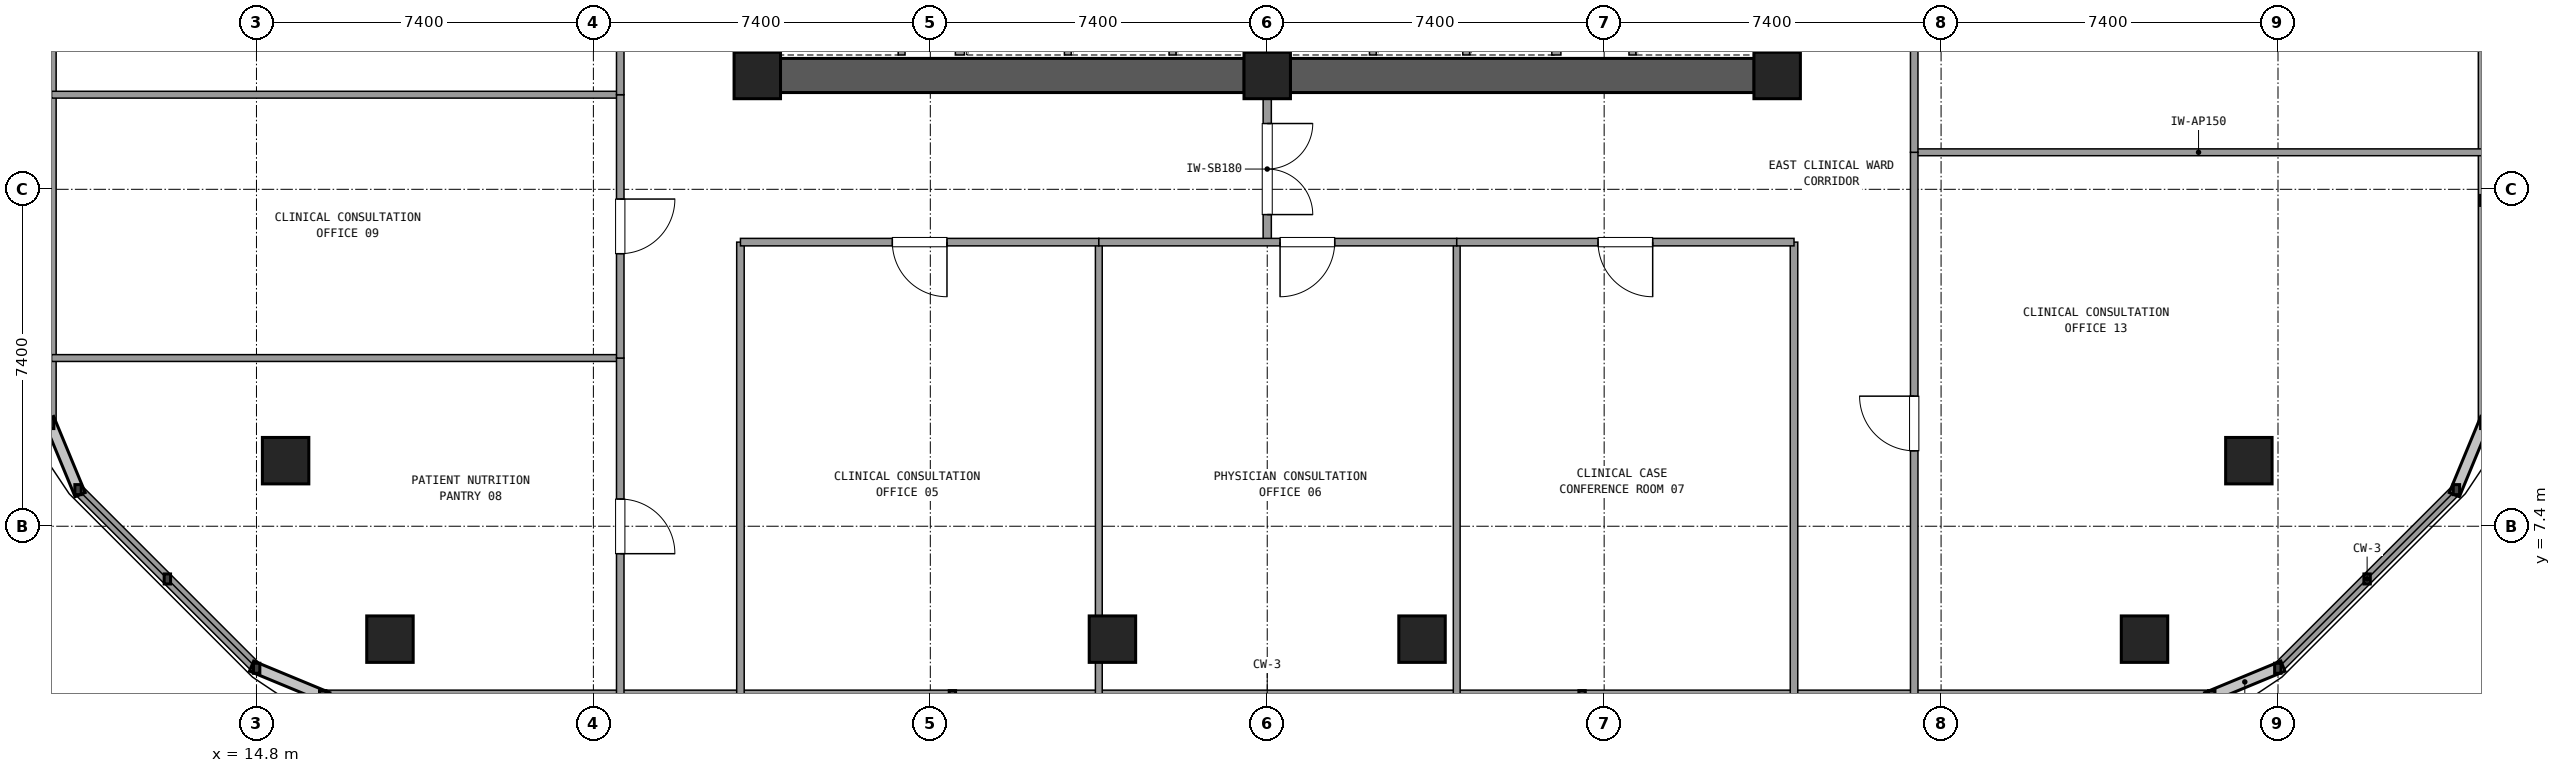
"""IFC4 building model, lengths in metres.
Left out: names, types, materials, properties, quantities, classifications, styles, units other than length and angle.
Written with IfcOpenShell. Run it as: python <this file> out.ifc"""

import sys

from ifc_helpers import new_model, si_unit, direction, frame, frame_2d, origin, origin_2d, place, context, subcontext, project, spatial, rectangle, extrude, element, fill, save


model = new_model("IFC4")
c1 = context("Model", 3, precision=1e-05, world=origin(), true_north=direction((0.0, 1.0)))
c2 = subcontext(c1, "Body", "Model", "MODEL_VIEW")
j1 = project(units=[si_unit("LENGTHUNIT", "METRE"), si_unit("PLANEANGLEUNIT", "RADIAN")], contexts=[c1])
p1 = place(None, origin())
s1 = spatial("IfcSite", under=j1, at=p1, CompositionType="ELEMENT")
p2 = place(p1, origin())
s2 = spatial("IfcBuilding", under=s1, at=p2, CompositionType="ELEMENT")
p3 = place(p2, frame((0.0, 0.0, 81.18)))
s3 = spatial("IfcBuildingStorey", under=s2, at=p3, CompositionType="ELEMENT", Elevation=81.18)
for number, where, z_axis, x_axis in (
    (1, (25.8, 17.3, 0.0), (0.0, 0.0, 1.0), (1.0, 0.0, 0.0)),
    (2, (37.0, 17.3, 0.0), (0.0, 0.0, 1.0), (1.0, 0.0, 0.0)),
    (3, (48.2, 17.3, 0.0), (0.0, 0.0, 1.0), (1.0, 0.0, 0.0)),
):
    element("IfcColumn", number, at=place(p3, frame(where, z_axis=z_axis, x_axis=x_axis)), inside=s3, PredefinedType="COLUMN", context=c2, shape_type="SweptSolid", body=[
        extrude(rectangle(XDim=1.02, YDim=1.02, at=origin_2d()), origin(), (0.0, 0.0, 1.0), 3.6),
    ])
for number, where, z_axis, x_axis in (
    (4, (26.305, 17.3, 0.0), (0.0, 0.0, 1.0), (1.0, 0.0, 0.0)),
    (5, (37.505, 17.3, 0.0), (0.0, 0.0, 1.0), (1.0, 0.0, 0.0)),
):
    element("IfcWall", number, at=place(p3, frame(where, z_axis=z_axis, x_axis=x_axis)), inside=s3, PredefinedType="SHEAR", context=c2, shape_type="SweptSolid", body=[
        extrude(rectangle(XDim=10.19, YDim=0.75, at=frame_2d((5.095, 0.0))), origin(), (0.0, 0.0, 1.0), 3.32),
    ])
for number, where, z_axis, x_axis in (
    (6, (15.44, 8.84, 0.0), (0.0, 0.0, 1.0), (1.0, 0.0, 0.0)),
    (7, (17.732, 4.92, 0.0), (0.0, 0.0, 1.0), (1.0, 0.0, 0.0)),
    (8, (33.6, 4.92, 0.0), (0.0, 0.0, 1.0), (1.0, 0.0, 0.0)),
    (9, (40.4, 4.92, 0.0), (0.0, 0.0, 1.0), (1.0, 0.0, 0.0)),
    (10, (56.268, 4.92, 0.0), (0.0, 0.0, 1.0), (1.0, 0.0, 0.0)),
    (11, (58.56, 8.84, 0.0), (0.0, 0.0, 1.0), (1.0, 0.0, 0.0)),
):
    element("IfcColumn", number, at=place(p3, frame(where, z_axis=z_axis, x_axis=x_axis)), inside=s3, PredefinedType="COLUMN", context=c2, shape_type="SweptSolid", body=[
        extrude(rectangle(XDim=1.02, YDim=1.02, at=origin_2d()), origin(), (0.0, 0.0, 1.0), 3.6),
    ])
p4 = place(p3, frame((16.255, 3.68, 0.0), z_axis=(0.0, 0.0, 1.0), x_axis=(1.0, 0.0, 0.0)))
e12 = element("IfcWall", 12, at=p4, inside=s3, PredefinedType="SOLIDWALL", context=c2, shape_type="SweptSolid", body=[
    extrude(rectangle(XDim=41.49, YDim=0.24, at=frame_2d((20.745, 0.0))), origin(), (0.0, 0.0, 1.0), 0.85),
])
p5 = place(p3, frame((59.196, 4.281, 0.0), z_axis=(0.0, 0.0, 1.0), x_axis=(0.707084777957, 0.707128783731, 0.0)))
e13 = element("IfcWall", 13, at=p5, inside=s3, PredefinedType="SOLIDWALL", context=c2, shape_type="SweptSolid", body=[
    extrude(rectangle(XDim=5.548, YDim=0.24, at=frame_2d((2.774, 0.0))), origin(), (0.0, 0.0, 1.0), 0.85),
])
p6 = place(p3, frame((63.72, 9.655, 0.0), z_axis=(0.0, 0.0, 1.0), x_axis=(0.0, 1.0, 0.0)))
e14 = element("IfcWall", 14, at=p6, inside=s3, PredefinedType="SOLIDWALL", context=c2, shape_type="SweptSolid", body=[
    extrude(rectangle(XDim=14.704, YDim=0.24, at=frame_2d((7.352, 0.0))), origin(), (0.0, 0.0, 1.0), 0.85),
])
p7 = place(p3, frame((10.28, 42.145, 0.0), z_axis=(0.0, 0.0, 1.0), x_axis=(0.0, -1.0, 0.0)))
e15 = element("IfcWall", 15, at=p7, inside=s3, PredefinedType="SOLIDWALL", context=c2, shape_type="SweptSolid", body=[
    extrude(rectangle(XDim=32.49, YDim=0.24, at=frame_2d((16.245, 0.0))), origin(), (0.0, 0.0, 1.0), 0.85),
])
p8 = place(p3, frame((10.881, 8.204, 0.0), z_axis=(0.0, 0.0, 1.0), x_axis=(0.707084777957, -0.707128783731, 0.0)))
e16 = element("IfcWall", 16, at=p8, inside=s3, PredefinedType="SOLIDWALL", context=c2, shape_type="SweptSolid", body=[
    extrude(rectangle(XDim=5.548, YDim=0.24, at=frame_2d((2.774, 0.0))), origin(), (0.0, 0.0, 1.0), 0.85),
])
p9 = place(p3, frame((30.25, 17.75, 0.0), z_axis=(0.0, 0.0, 1.0), x_axis=(0.0, 1.0, 0.0)))
e17 = element("IfcWall", 17, at=p9, inside=s3, PredefinedType="SOLIDWALL", context=c2, shape_type="SweptSolid", body=[
    extrude(rectangle(XDim=6.9, YDim=0.2, at=frame_2d((3.45, 0.0))), origin(), (0.0, 0.0, 1.0), 2.61),
])
p10 = place(p9, frame((4.15, 0.0, 0.0)))
e18 = element("IfcOpeningElement", 18, at=p10, cuts=e17, PredefinedType="OPENING", context=c2, shape_type="SweptSolid", body=[
    extrude(rectangle(XDim=1.2, YDim=2.15, at=frame_2d((0.6, 1.075))), frame((0.0, 0.11, 0.0), z_axis=(0.0, -1.0, 0.0), x_axis=(1.0, 0.0, 0.0)), (0.0, 0.0, 1.0), 0.22),
])
p11 = place(p3, frame((28.97, 17.75, 0.0), z_axis=(0.0, 0.0, 1.0), x_axis=(0.0, 1.0, 0.0)))
e19 = element("IfcWall", 19, at=p11, inside=s3, PredefinedType="PARTITIONING", context=c2, shape_type="SweptSolid", body=[
    extrude(rectangle(XDim=2.95, YDim=0.15, at=frame_2d((1.475, 0.0))), origin(), (0.0, 0.0, 1.0), 2.61),
])
p12 = place(p3, frame((43.35, 17.75, 0.0), z_axis=(0.0, 0.0, 1.0), x_axis=(0.0, 1.0, 0.0)))
e20 = element("IfcWall", 20, at=p12, inside=s3, PredefinedType="SOLIDWALL", context=c2, shape_type="SweptSolid", body=[
    extrude(rectangle(XDim=6.9, YDim=0.2, at=frame_2d((3.45, 0.0))), origin(), (0.0, 0.0, 1.0), 2.61),
])
p13 = place(p12, frame((4.15, 0.0, 0.0)))
e21 = element("IfcOpeningElement", 21, at=p13, cuts=e20, PredefinedType="OPENING", context=c2, shape_type="SweptSolid", body=[
    extrude(rectangle(XDim=1.2, YDim=2.15, at=frame_2d((0.6, 1.075))), frame((0.0, 0.11, 0.0), z_axis=(0.0, -1.0, 0.0), x_axis=(1.0, 0.0, 0.0)), (0.0, 0.0, 1.0), 0.22),
])
p14 = place(p3, frame((45.02, 17.75, 0.0), z_axis=(0.0, 0.0, 1.0), x_axis=(0.0, 1.0, 0.0)))
e22 = element("IfcWall", 22, at=p14, inside=s3, PredefinedType="PARTITIONING", context=c2, shape_type="SweptSolid", body=[
    extrude(rectangle(XDim=2.95, YDim=0.15, at=frame_2d((1.475, 0.0))), origin(), (0.0, 0.0, 1.0), 2.61),
])
for number, where, z_axis, x_axis in (
    (23, (32.62, 17.75, 0.0), (0.0, 0.0, 1.0), (0.0, 1.0, 0.0)),
    (24, (34.92, 17.75, 0.0), (0.0, 0.0, 1.0), (0.0, 1.0, 0.0)),
    (25, (39.32, 17.75, 0.0), (0.0, 0.0, 1.0), (0.0, 1.0, 0.0)),
    (26, (41.37, 17.75, 0.0), (0.0, 0.0, 1.0), (0.0, 1.0, 0.0)),
):
    element("IfcWall", number, at=place(p3, frame(where, z_axis=z_axis, x_axis=x_axis)), inside=s3, PredefinedType="PARTITIONING", context=c2, shape_type="SweptSolid", body=[
        extrude(rectangle(XDim=2.61, YDim=0.15, at=frame_2d((1.305, 0.0))), origin(), (0.0, 0.0, 1.0), 2.61),
    ])
p15 = place(p3, frame((37.25, 17.75, 0.0), z_axis=(0.0, 0.0, 1.0), x_axis=(0.0, 1.0, 0.0)))
e27 = element("IfcWall", 27, at=p15, inside=s3, PredefinedType="PARTITIONING", context=c2, shape_type="SweptSolid", body=[
    extrude(rectangle(XDim=2.73, YDim=0.15, at=frame_2d((1.365, 0.0))), origin(), (0.0, 0.0, 1.0), 2.61),
])
p16 = place(p3, frame((37.0, 13.64, 0.0), z_axis=(0.0, 0.0, 1.0), x_axis=(0.0, 1.0, 0.0)))
e28 = element("IfcWall", 28, at=p16, inside=s3, PredefinedType="PARTITIONING", context=c2, shape_type="SweptSolid", body=[
    extrude(rectangle(XDim=3.21, YDim=0.18, at=frame_2d((1.605, 0.0))), origin(), (0.0, 0.0, 1.0), 2.61),
])
p17 = place(p16, frame((0.605, 0.0, 0.0)))
e29 = element("IfcOpeningElement", 29, at=p17, cuts=e28, PredefinedType="OPENING", context=c2, shape_type="SweptSolid", body=[
    extrude(rectangle(XDim=2.0, YDim=2.2, at=frame_2d((1.0, 1.1))), frame((0.0, 0.1, 0.0), z_axis=(0.0, -1.0, 0.0), x_axis=(1.0, 0.0, 0.0)), (0.0, 0.0, 1.0), 0.2),
])
for number, where, z_axis, x_axis in (
    (30, (25.43, 3.7, 0.0), (0.0, 0.0, 1.0), (0.0, 1.0, 0.0)),
    (31, (48.57, 3.7, 0.0), (0.0, 0.0, 1.0), (0.0, 1.0, 0.0)),
):
    element("IfcWall", number, at=place(p3, frame(where, z_axis=z_axis, x_axis=x_axis)), inside=s3, PredefinedType="PARTITIONING", context=c2, shape_type="SweptSolid", body=[
        extrude(rectangle(XDim=9.94, YDim=0.165, at=frame_2d((4.97, 0.0))), origin(), (0.0, 0.0, 1.0), 2.61),
    ])
p18 = place(p3, frame((33.301, 13.64, 0.0), z_axis=(0.0, 0.0, 1.0), x_axis=(0.0, -1.0, 0.0)))
e32 = element("IfcWall", 32, at=p18, inside=s3, PredefinedType="PARTITIONING", context=c2, shape_type="SweptSolid", body=[
    extrude(rectangle(XDim=9.94, YDim=0.15, at=frame_2d((4.97, 0.0))), origin(), (0.0, 0.0, 1.0), 2.61),
])
p19 = place(p3, frame((25.43, 13.64, 0.0), z_axis=(0.0, 0.0, 1.0), x_axis=(1.0, 0.0, 0.0)))
e33 = element("IfcWall", 33, at=p19, inside=s3, PredefinedType="PARTITIONING", context=c2, shape_type="SweptSolid", body=[
    extrude(rectangle(XDim=7.871, YDim=0.165, at=frame_2d((3.936, 0.0))), origin(), (0.0, 0.0, 1.0), 2.61),
])
p20 = place(p19, frame((3.336, 0.0, 0.0)))
e34 = element("IfcOpeningElement", 34, at=p20, cuts=e33, PredefinedType="OPENING", context=c2, shape_type="SweptSolid", body=[
    extrude(rectangle(XDim=1.2, YDim=2.15, at=frame_2d((0.6, 1.075))), frame((0.0, 0.093, 0.0), z_axis=(0.0, -1.0, 0.0), x_axis=(1.0, 0.0, 0.0)), (0.0, 0.0, 1.0), 0.185),
])
p21 = place(p3, frame((41.162, 13.64, 0.0), z_axis=(0.0, 0.0, 1.0), x_axis=(0.0, -1.0, 0.0)))
e35 = element("IfcWall", 35, at=p21, inside=s3, PredefinedType="PARTITIONING", context=c2, shape_type="SweptSolid", body=[
    extrude(rectangle(XDim=9.94, YDim=0.15, at=frame_2d((4.97, 0.0))), origin(), (0.0, 0.0, 1.0), 2.61),
])
p22 = place(p3, frame((33.301, 13.64, 0.0), z_axis=(0.0, 0.0, 1.0), x_axis=(1.0, 0.0, 0.0)))
e36 = element("IfcWall", 36, at=p22, inside=s3, PredefinedType="PARTITIONING", context=c2, shape_type="SweptSolid", body=[
    extrude(rectangle(XDim=7.861, YDim=0.165, at=frame_2d((3.931, 0.0))), origin(), (0.0, 0.0, 1.0), 2.61),
])
p23 = place(p22, frame((3.981, 0.0, 0.0)))
e37 = element("IfcOpeningElement", 37, at=p23, cuts=e36, PredefinedType="OPENING", context=c2, shape_type="SweptSolid", body=[
    extrude(rectangle(XDim=1.2, YDim=2.15, at=frame_2d((0.6, 1.075))), frame((0.0, 0.093, 0.0), z_axis=(0.0, -1.0, 0.0), x_axis=(1.0, 0.0, 0.0)), (0.0, 0.0, 1.0), 0.185),
])
p24 = place(p3, frame((41.162, 13.64, 0.0), z_axis=(0.0, 0.0, 1.0), x_axis=(1.0, 0.0, 0.0)))
e38 = element("IfcWall", 38, at=p24, inside=s3, PredefinedType="PARTITIONING", context=c2, shape_type="SweptSolid", body=[
    extrude(rectangle(XDim=7.408, YDim=0.165, at=frame_2d((3.704, 0.0))), origin(), (0.0, 0.0, 1.0), 2.61),
])
p25 = place(p24, frame((3.104, 0.0, 0.0)))
e39 = element("IfcOpeningElement", 39, at=p25, cuts=e38, PredefinedType="OPENING", context=c2, shape_type="SweptSolid", body=[
    extrude(rectangle(XDim=1.2, YDim=2.15, at=frame_2d((0.6, 1.075))), frame((0.0, 0.093, 0.0), z_axis=(0.0, -1.0, 0.0), x_axis=(1.0, 0.0, 0.0)), (0.0, 0.0, 1.0), 0.185),
])
p26 = place(p3, frame((22.79, 11.094, 0.0), z_axis=(0.0, 0.0, 1.0), x_axis=(-1.0, 0.0, 0.0)))
e40 = element("IfcWall", 40, at=p26, inside=s3, PredefinedType="PARTITIONING", context=c2, shape_type="SweptSolid", body=[
    extrude(rectangle(XDim=12.49, YDim=0.15, at=frame_2d((6.245, 0.0))), origin(), (0.0, 0.0, 1.0), 2.61),
])
p27 = place(p3, frame((22.79, 3.7, 0.0), z_axis=(0.0, 0.0, 1.0), x_axis=(0.0, 1.0, 0.0)))
e41 = element("IfcWall", 41, at=p27, inside=s3, PredefinedType="PARTITIONING", context=c2, shape_type="SweptSolid", body=[
    extrude(rectangle(XDim=7.394, YDim=0.165, at=frame_2d((3.697, 0.0))), origin(), (0.0, 0.0, 1.0), 2.61),
])
p28 = place(p27, frame((3.097, 0.0, 0.0)))
e42 = element("IfcOpeningElement", 42, at=p28, cuts=e41, PredefinedType="OPENING", context=c2, shape_type="SweptSolid", body=[
    extrude(rectangle(XDim=1.2, YDim=2.15, at=frame_2d((0.6, 1.075))), frame((0.0, 0.093, 0.0), z_axis=(0.0, -1.0, 0.0), x_axis=(1.0, 0.0, 0.0)), (0.0, 0.0, 1.0), 0.185),
])
p29 = place(p3, frame((22.79, 16.878, 0.0), z_axis=(0.0, 0.0, 1.0), x_axis=(-1.0, 0.0, 0.0)))
e43 = element("IfcWall", 43, at=p29, inside=s3, PredefinedType="PARTITIONING", context=c2, shape_type="SweptSolid", body=[
    extrude(rectangle(XDim=12.49, YDim=0.15, at=frame_2d((6.245, 0.0))), origin(), (0.0, 0.0, 1.0), 2.61),
])
p30 = place(p3, frame((22.79, 11.094, 0.0), z_axis=(0.0, 0.0, 1.0), x_axis=(0.0, 1.0, 0.0)))
e44 = element("IfcWall", 44, at=p30, inside=s3, PredefinedType="PARTITIONING", context=c2, shape_type="SweptSolid", body=[
    extrude(rectangle(XDim=5.784, YDim=0.165, at=frame_2d((2.892, 0.0))), origin(), (0.0, 0.0, 1.0), 2.61),
])
p31 = place(p30, frame((2.292, 0.0, 0.0)))
e45 = element("IfcOpeningElement", 45, at=p31, cuts=e44, PredefinedType="OPENING", context=c2, shape_type="SweptSolid", body=[
    extrude(rectangle(XDim=1.2, YDim=2.15, at=frame_2d((0.6, 1.075))), frame((0.0, 0.093, 0.0), z_axis=(0.0, -1.0, 0.0), x_axis=(1.0, 0.0, 0.0)), (0.0, 0.0, 1.0), 0.185),
])
p32 = place(p3, frame((22.79, 16.878, 0.0), z_axis=(0.0, 0.0, 1.0), x_axis=(0.0, 1.0, 0.0)))
e46 = element("IfcWall", 46, at=p32, inside=s3, PredefinedType="PARTITIONING", context=c2, shape_type="SweptSolid", body=[
    extrude(rectangle(XDim=7.362, YDim=0.165, at=frame_2d((3.681, 0.0))), origin(), (0.0, 0.0, 1.0), 2.61),
])
p33 = place(p32, frame((3.081, 0.0, 0.0)))
e47 = element("IfcOpeningElement", 47, at=p33, cuts=e46, PredefinedType="OPENING", context=c2, shape_type="SweptSolid", body=[
    extrude(rectangle(XDim=1.2, YDim=2.15, at=frame_2d((0.6, 1.075))), frame((0.0, 0.093, 0.0), z_axis=(0.0, -1.0, 0.0), x_axis=(1.0, 0.0, 0.0)), (0.0, 0.0, 1.0), 0.185),
])
p34 = place(p3, frame((51.21, 15.613, 0.0), z_axis=(0.0, 0.0, 1.0), x_axis=(1.0, 0.0, 0.0)))
e48 = element("IfcWall", 48, at=p34, inside=s3, PredefinedType="PARTITIONING", context=c2, shape_type="SweptSolid", body=[
    extrude(rectangle(XDim=12.49, YDim=0.15, at=frame_2d((6.245, 0.0))), origin(), (0.0, 0.0, 1.0), 2.61),
])
p35 = place(p3, frame((51.21, 3.7, 0.0), z_axis=(0.0, 0.0, 1.0), x_axis=(0.0, 1.0, 0.0)))
e49 = element("IfcWall", 49, at=p35, inside=s3, PredefinedType="PARTITIONING", context=c2, shape_type="SweptSolid", body=[
    extrude(rectangle(XDim=11.913, YDim=0.165, at=frame_2d((5.957, 0.0))), origin(), (0.0, 0.0, 1.0), 2.61),
])
p36 = place(p35, frame((5.357, 0.0, 0.0)))
e50 = element("IfcOpeningElement", 50, at=p36, cuts=e49, PredefinedType="OPENING", context=c2, shape_type="SweptSolid", body=[
    extrude(rectangle(XDim=1.2, YDim=2.15, at=frame_2d((0.6, 1.075))), frame((0.0, 0.093, 0.0), z_axis=(0.0, -1.0, 0.0), x_axis=(1.0, 0.0, 0.0)), (0.0, 0.0, 1.0), 0.185),
])
p37 = place(p3, frame((51.21, 15.613, 0.0), z_axis=(0.0, 0.0, 1.0), x_axis=(0.0, 1.0, 0.0)))
e51 = element("IfcWall", 51, at=p37, inside=s3, PredefinedType="PARTITIONING", context=c2, shape_type="SweptSolid", body=[
    extrude(rectangle(XDim=8.627, YDim=0.165, at=frame_2d((4.313, 0.0))), origin(), (0.0, 0.0, 1.0), 2.61),
])
p38 = place(p37, frame((3.713, 0.0, 0.0)))
e52 = element("IfcOpeningElement", 52, at=p38, cuts=e51, PredefinedType="OPENING", context=c2, shape_type="SweptSolid", body=[
    extrude(rectangle(XDim=1.2, YDim=2.15, at=frame_2d((0.6, 1.075))), frame((0.0, 0.093, 0.0), z_axis=(0.0, -1.0, 0.0), x_axis=(1.0, 0.0, 0.0)), (0.0, 0.0, 1.0), 0.185),
])
p39 = place(p17, frame((2.0, 0.0, 0.0), z_axis=(0.0, 0.0, 1.0), x_axis=(-1.0, 0.0, 0.0)))
e53 = element("IfcDoor", 53, at=p39, inside=s3, OperationType="DOUBLE_DOOR_SINGLE_SWING", PredefinedType="DOOR", context=c2, shape_type="SweptSolid", body=[
    extrude(rectangle(XDim=2.0, YDim=2.2, at=frame_2d((1.0, 1.1))), frame((0.0, 0.025, 0.0), z_axis=(0.0, -1.0, 0.0), x_axis=(1.0, 0.0, 0.0)), (0.0, 0.0, 1.0), 0.05),
])
fill(e29, e53)
p40 = place(p20, frame((1.2, 0.0, 0.0), z_axis=(0.0, 0.0, 1.0), x_axis=(-1.0, 0.0, 0.0)))
e54 = element("IfcDoor", 54, at=p40, inside=s3, OperationType="SINGLE_SWING_RIGHT", PredefinedType="DOOR", context=c2, shape_type="SweptSolid", body=[
    extrude(rectangle(XDim=1.2, YDim=2.15, at=frame_2d((0.6, 1.075))), frame((0.0, 0.025, 0.0), z_axis=(0.0, -1.0, 0.0), x_axis=(1.0, 0.0, 0.0)), (0.0, 0.0, 1.0), 0.05),
])
fill(e34, e54)
p41 = place(p23, frame((1.2, 0.0, 0.0), z_axis=(0.0, 0.0, 1.0), x_axis=(-1.0, 0.0, 0.0)))
e55 = element("IfcDoor", 55, at=p41, inside=s3, OperationType="SINGLE_SWING_LEFT", PredefinedType="DOOR", context=c2, shape_type="SweptSolid", body=[
    extrude(rectangle(XDim=1.2, YDim=2.15, at=frame_2d((0.6, 1.075))), frame((0.0, 0.025, 0.0), z_axis=(0.0, -1.0, 0.0), x_axis=(1.0, 0.0, 0.0)), (0.0, 0.0, 1.0), 0.05),
])
fill(e37, e55)
p42 = place(p25, frame((1.2, 0.0, 0.0), z_axis=(0.0, 0.0, 1.0), x_axis=(-1.0, 0.0, 0.0)))
e56 = element("IfcDoor", 56, at=p42, inside=s3, OperationType="SINGLE_SWING_RIGHT", PredefinedType="DOOR", context=c2, shape_type="SweptSolid", body=[
    extrude(rectangle(XDim=1.2, YDim=2.15, at=frame_2d((0.6, 1.075))), frame((0.0, 0.025, 0.0), z_axis=(0.0, -1.0, 0.0), x_axis=(1.0, 0.0, 0.0)), (0.0, 0.0, 1.0), 0.05),
])
fill(e39, e56)
p43 = place(p28, frame((1.2, 0.0, 0.0), z_axis=(0.0, 0.0, 1.0), x_axis=(-1.0, 0.0, 0.0)))
e57 = element("IfcDoor", 57, at=p43, inside=s3, OperationType="SINGLE_SWING_LEFT", PredefinedType="DOOR", context=c2, shape_type="SweptSolid", body=[
    extrude(rectangle(XDim=1.2, YDim=2.15, at=frame_2d((0.6, 1.075))), frame((0.0, 0.025, 0.0), z_axis=(0.0, -1.0, 0.0), x_axis=(1.0, 0.0, 0.0)), (0.0, 0.0, 1.0), 0.05),
])
fill(e42, e57)
p44 = place(p31, frame((1.2, 0.0, 0.0), z_axis=(0.0, 0.0, 1.0), x_axis=(-1.0, 0.0, 0.0)))
e58 = element("IfcDoor", 58, at=p44, inside=s3, OperationType="SINGLE_SWING_RIGHT", PredefinedType="DOOR", context=c2, shape_type="SweptSolid", body=[
    extrude(rectangle(XDim=1.2, YDim=2.15, at=frame_2d((0.6, 1.075))), frame((0.0, 0.025, 0.0), z_axis=(0.0, -1.0, 0.0), x_axis=(1.0, 0.0, 0.0)), (0.0, 0.0, 1.0), 0.05),
])
fill(e45, e58)
p45 = place(p36, origin())
e59 = element("IfcDoor", 59, at=p45, inside=s3, OperationType="SINGLE_SWING_RIGHT", PredefinedType="DOOR", context=c2, shape_type="SweptSolid", body=[
    extrude(rectangle(XDim=1.2, YDim=2.15, at=frame_2d((0.6, 1.075))), frame((0.0, 0.025, 0.0), z_axis=(0.0, -1.0, 0.0), x_axis=(1.0, 0.0, 0.0)), (0.0, 0.0, 1.0), 0.05),
])
fill(e50, e59)
save(model, sys.argv[1])
